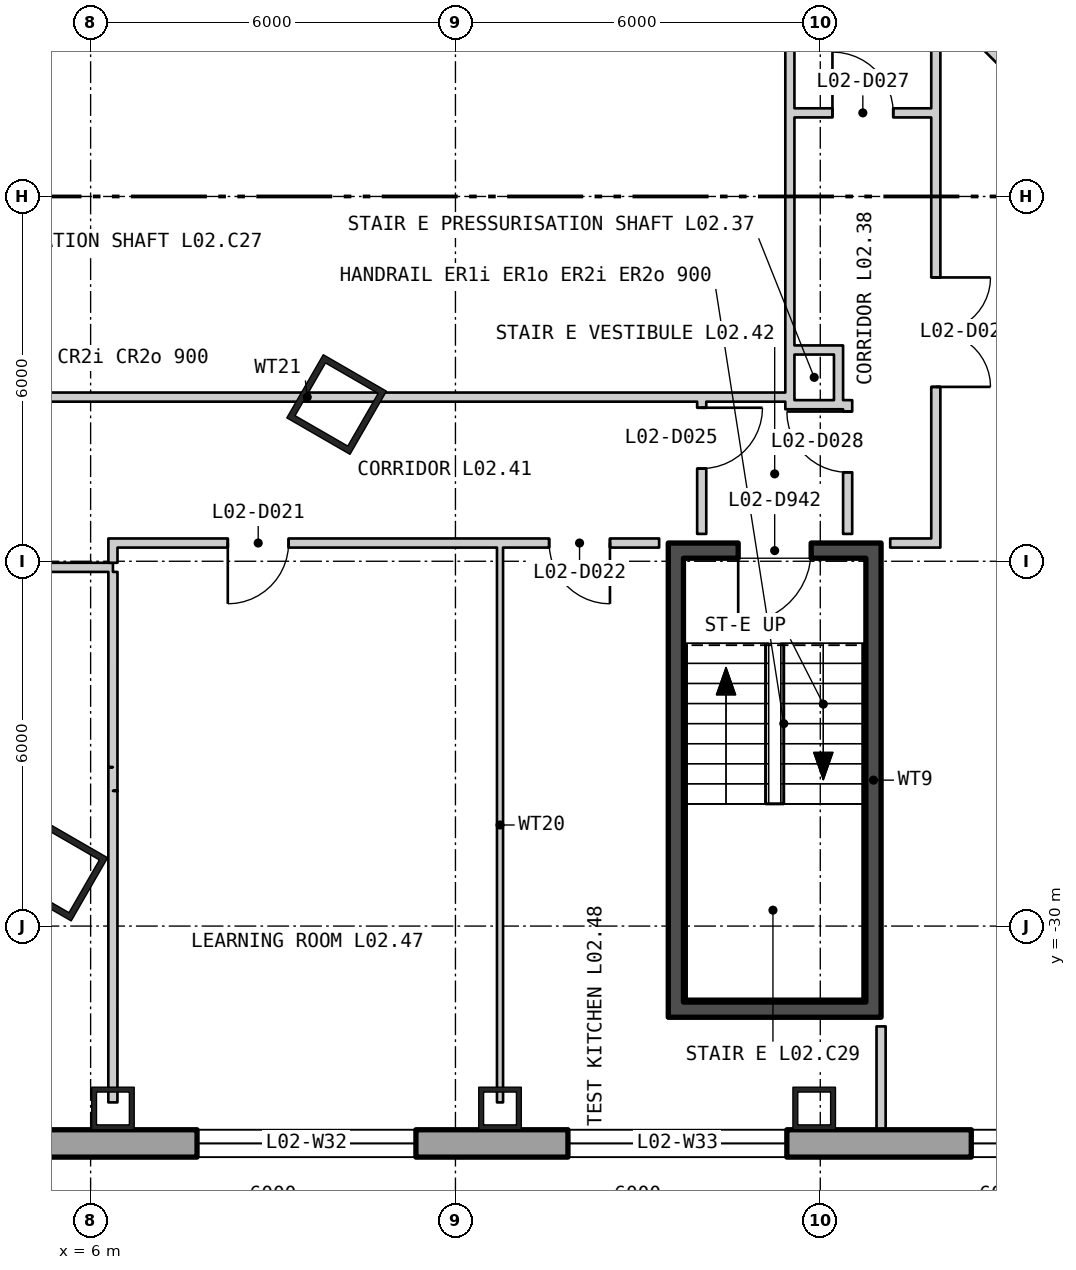
"""IFC4 building model, lengths in metres.
Left out: names, types, materials, properties, quantities, classifications, styles, units other than length and angle.
Written with IfcOpenShell. Run it as: python <this file> out.ifc"""

import sys

from ifc_helpers import new_model, si_unit, direction, frame, frame_2d, origin, origin_2d, place, context, subcontext, project, spatial, polyline, rectangle, hollow_rectangle, outline, extrude, element, fill, save


model = new_model("IFC4")
c1 = context("Model", 3, precision=1e-05, world=origin(), true_north=direction((0.0, 1.0)))
c2 = subcontext(c1, "Body", "Model", "MODEL_VIEW")
j1 = project(units=[si_unit("LENGTHUNIT", "METRE"), si_unit("PLANEANGLEUNIT", "RADIAN")], contexts=[c1])
p1 = place(None, origin())
s1 = spatial("IfcSite", under=j1, at=p1, CompositionType="ELEMENT")
p2 = place(p1, origin())
s2 = spatial("IfcBuilding", under=s1, at=p2, CompositionType="ELEMENT")
p3 = place(p2, frame((0.0, 0.0, 13.5)))
s3 = spatial("IfcBuildingStorey", under=s2, at=p3, CompositionType="ELEMENT", Elevation=13.5)
for number, where, z_axis, x_axis in (
    (1, (5.461, -29.096, 0.0), (0.0, 0.0, 1.0), (0.5, 0.866, 0.0)),
    (2, (10.046, -21.422, 0.0), (0.0, 0.0, 1.0), (0.5, 0.866, 0.0)),
):
    element("IfcColumn", number, at=place(p3, frame(where, z_axis=z_axis, x_axis=x_axis)), inside=s3, PredefinedType="COLUMN", context=c2, shape_type="SweptSolid", body=[
        extrude(hollow_rectangle(XDim=1.2, YDim=1.2, WallThickness=0.1, at=origin_2d()), origin(), (0.0, 0.0, 1.0), 5.1),
    ])
for number, where, z_axis, x_axis in (
    (3, (6.367, -33.0, 0.0), (0.0, 0.0, 1.0), (1.0, 0.0, 0.0)),
    (4, (12.733, -33.0, 0.0), (0.0, 0.0, 1.0), (1.0, 0.0, 0.0)),
    (5, (17.9, -33.0, 0.0), (0.0, 0.0, 1.0), (1.0, 0.0, 0.0)),
):
    element("IfcColumn", number, at=place(p3, frame(where, z_axis=z_axis, x_axis=x_axis)), inside=s3, PredefinedType="COLUMN", context=c2, shape_type="SweptSolid", body=[
        extrude(hollow_rectangle(XDim=0.7, YDim=0.7, WallThickness=0.08, at=origin_2d()), origin(), (0.0, 0.0, 1.0), 5.1),
    ])
p4 = place(p3, frame((-38.775, -33.575, -0.4), z_axis=(0.0, 0.0, 1.0), x_axis=(1.0, 0.0, 0.0)))
e6 = element("IfcWall", 6, at=p4, inside=s3, PredefinedType="SOLIDWALL", context=c2, shape_type="SweptSolid", body=[
    extrude(outline(polyline([(-0.225, -0.225), (77.775, -0.225), (77.325, 0.225), (0.225, 0.225), (-0.225, -0.225)])), origin(), (0.0, 0.0, 1.0), 5.1),
])
p5 = place(p4, frame((1.958, 0.0, 1.3)))
e7 = element("IfcOpeningElement", 7, at=p5, cuts=e6, PredefinedType="OPENING", context=c2, shape_type="SweptSolid", body=[
    extrude(rectangle(XDim=3.6, YDim=3.2, at=frame_2d((1.8, 1.6))), frame((0.0, 0.235, 0.0), z_axis=(0.0, -1.0, 0.0), x_axis=(1.0, 0.0, 0.0)), (0.0, 0.0, 1.0), 0.47),
])
p6 = place(p4, frame((8.325, 0.0, 1.3)))
e8 = element("IfcOpeningElement", 8, at=p6, cuts=e6, PredefinedType="OPENING", context=c2, shape_type="SweptSolid", body=[
    extrude(rectangle(XDim=3.6, YDim=3.2, at=frame_2d((1.8, 1.6))), frame((0.0, 0.235, 0.0), z_axis=(0.0, -1.0, 0.0), x_axis=(1.0, 0.0, 0.0)), (0.0, 0.0, 1.0), 0.47),
])
p7 = place(p4, frame((14.692, 0.0, 1.3)))
e9 = element("IfcOpeningElement", 9, at=p7, cuts=e6, PredefinedType="OPENING", context=c2, shape_type="SweptSolid", body=[
    extrude(rectangle(XDim=3.6, YDim=3.2, at=frame_2d((1.8, 1.6))), frame((0.0, 0.235, 0.0), z_axis=(0.0, -1.0, 0.0), x_axis=(1.0, 0.0, 0.0)), (0.0, 0.0, 1.0), 0.47),
])
p8 = place(p4, frame((21.325, 0.0, 1.3)))
e10 = element("IfcOpeningElement", 10, at=p8, cuts=e6, PredefinedType="OPENING", context=c2, shape_type="SweptSolid", body=[
    extrude(rectangle(XDim=3.6, YDim=3.2, at=frame_2d((1.8, 1.6))), frame((0.0, 0.235, 0.0), z_axis=(0.0, -1.0, 0.0), x_axis=(1.0, 0.0, 0.0)), (0.0, 0.0, 1.0), 0.47),
])
p9 = place(p4, frame((27.425, 0.0, 1.3)))
e11 = element("IfcOpeningElement", 11, at=p9, cuts=e6, PredefinedType="OPENING", context=c2, shape_type="SweptSolid", body=[
    extrude(rectangle(XDim=3.6, YDim=3.2, at=frame_2d((1.8, 1.6))), frame((0.0, 0.235, 0.0), z_axis=(0.0, -1.0, 0.0), x_axis=(1.0, 0.0, 0.0)), (0.0, 0.0, 1.0), 0.47),
])
p10 = place(p4, frame((33.792, 0.0, 1.3)))
e12 = element("IfcOpeningElement", 12, at=p10, cuts=e6, PredefinedType="OPENING", context=c2, shape_type="SweptSolid", body=[
    extrude(rectangle(XDim=3.6, YDim=3.2, at=frame_2d((1.8, 1.6))), frame((0.0, 0.235, 0.0), z_axis=(0.0, -1.0, 0.0), x_axis=(1.0, 0.0, 0.0)), (0.0, 0.0, 1.0), 0.47),
])
p11 = place(p4, frame((40.158, 0.0, 1.3)))
e13 = element("IfcOpeningElement", 13, at=p11, cuts=e6, PredefinedType="OPENING", context=c2, shape_type="SweptSolid", body=[
    extrude(rectangle(XDim=3.6, YDim=3.2, at=frame_2d((1.8, 1.6))), frame((0.0, 0.235, 0.0), z_axis=(0.0, -1.0, 0.0), x_axis=(1.0, 0.0, 0.0)), (0.0, 0.0, 1.0), 0.47),
])
p12 = place(p4, frame((46.525, 0.0, 1.3)))
e14 = element("IfcOpeningElement", 14, at=p12, cuts=e6, PredefinedType="OPENING", context=c2, shape_type="SweptSolid", body=[
    extrude(rectangle(XDim=3.6, YDim=3.2, at=frame_2d((1.8, 1.6))), frame((0.0, 0.235, 0.0), z_axis=(0.0, -1.0, 0.0), x_axis=(1.0, 0.0, 0.0)), (0.0, 0.0, 1.0), 0.47),
])
p13 = place(p4, frame((52.625, 0.0, 1.3)))
e15 = element("IfcOpeningElement", 15, at=p13, cuts=e6, PredefinedType="OPENING", context=c2, shape_type="SweptSolid", body=[
    extrude(rectangle(XDim=3.6, YDim=3.2, at=frame_2d((1.8, 1.6))), frame((0.0, 0.235, 0.0), z_axis=(0.0, -1.0, 0.0), x_axis=(1.0, 0.0, 0.0)), (0.0, 0.0, 1.0), 0.47),
])
p14 = place(p4, frame((59.258, 0.0, 1.3)))
e16 = element("IfcOpeningElement", 16, at=p14, cuts=e6, PredefinedType="OPENING", context=c2, shape_type="SweptSolid", body=[
    extrude(rectangle(XDim=3.6, YDim=3.2, at=frame_2d((1.8, 1.6))), frame((0.0, 0.235, 0.0), z_axis=(0.0, -1.0, 0.0), x_axis=(1.0, 0.0, 0.0)), (0.0, 0.0, 1.0), 0.47),
])
p15 = place(p4, frame((65.625, 0.0, 1.3)))
e17 = element("IfcOpeningElement", 17, at=p15, cuts=e6, PredefinedType="OPENING", context=c2, shape_type="SweptSolid", body=[
    extrude(rectangle(XDim=3.6, YDim=3.2, at=frame_2d((1.8, 1.6))), frame((0.0, 0.235, 0.0), z_axis=(0.0, -1.0, 0.0), x_axis=(1.0, 0.0, 0.0)), (0.0, 0.0, 1.0), 0.47),
])
p16 = place(p4, frame((71.992, 0.0, 1.3)))
e18 = element("IfcOpeningElement", 18, at=p16, cuts=e6, PredefinedType="OPENING", context=c2, shape_type="SweptSolid", body=[
    extrude(rectangle(XDim=3.6, YDim=3.2, at=frame_2d((1.8, 1.6))), frame((0.0, 0.235, 0.0), z_axis=(0.0, -1.0, 0.0), x_axis=(1.0, 0.0, 0.0)), (0.0, 0.0, 1.0), 0.47),
])
for number, where, z_axis, x_axis in (
    (19, (15.625, -31.25, 0.0), (0.0, 0.0, 1.0), (0.0, 1.0, 0.0)),
    (20, (18.875, -31.25, 0.0), (0.0, 0.0, 1.0), (0.0, 1.0, 0.0)),
):
    element("IfcWall", number, at=place(p3, frame(where, z_axis=z_axis, x_axis=x_axis)), inside=s3, PredefinedType="SHEAR", context=c2, shape_type="SweptSolid", body=[
        extrude(rectangle(XDim=7.3, YDim=0.25, at=frame_2d((3.65, 0.0))), origin(), (0.0, 0.0, 1.0), 4.88),
    ])
p17 = place(p3, frame((15.5, -31.375, 0.0), z_axis=(0.0, 0.0, 1.0), x_axis=(1.0, 0.0, 0.0)))
e21 = element("IfcWall", 21, at=p17, inside=s3, PredefinedType="SHEAR", context=c2, shape_type="SweptSolid", body=[
    extrude(rectangle(XDim=3.5, YDim=0.25, at=frame_2d((1.75, 0.0))), origin(), (0.0, 0.0, 1.0), 4.88),
])
p18 = place(p3, frame((15.5, -23.825, 0.0), z_axis=(0.0, 0.0, 1.0), x_axis=(1.0, 0.0, 0.0)))
e22 = element("IfcWall", 22, at=p18, inside=s3, PredefinedType="SHEAR", context=c2, shape_type="SweptSolid", body=[
    extrude(rectangle(XDim=3.5, YDim=0.25, at=frame_2d((1.75, 0.0))), origin(), (0.0, 0.0, 1.0), 4.88),
])
p19 = place(p18, frame((1.15, 0.0, 0.0)))
e23 = element("IfcOpeningElement", 23, at=p19, cuts=e22, PredefinedType="OPENING", context=c2, shape_type="SweptSolid", body=[
    extrude(rectangle(XDim=1.2, YDim=2.1, at=frame_2d((0.6, 1.05))), frame((0.0, 0.135, 0.0), z_axis=(0.0, -1.0, 0.0), x_axis=(1.0, 0.0, 0.0)), (0.0, 0.0, 1.0), 0.27),
])
p20 = place(p3, frame((-12.733, -24.1, 0.0), z_axis=(0.0, 0.0, 1.0), x_axis=(1.0, 0.0, 0.0)))
e24 = element("IfcWall", 24, at=p20, inside=s3, PredefinedType="PARTITIONING", context=c2, shape_type="SweptSolid", body=[
    extrude(rectangle(XDim=19.1, YDim=0.15, at=frame_2d((9.55, 0.0))), origin(), (0.0, 0.0, 1.0), 4.88),
])
p21 = place(p20, frame((8.907, 0.0, 0.0)))
e25 = element("IfcOpeningElement", 25, at=p21, cuts=e24, PredefinedType="OPENING", context=c2, shape_type="SweptSolid", body=[
    extrude(rectangle(XDim=1.0, YDim=2.1, at=frame_2d((0.5, 1.05))), frame((0.0, 0.085, 0.0), z_axis=(0.0, -1.0, 0.0), x_axis=(1.0, 0.0, 0.0)), (0.0, 0.0, 1.0), 0.17),
])
p22 = place(p3, frame((1.7, -21.3, 0.0), z_axis=(0.0, 0.0, 1.0), x_axis=(1.0, 0.0, 0.0)))
e26 = element("IfcWall", 26, at=p22, inside=s3, PredefinedType="PARTITIONING", context=c2, shape_type="SweptSolid", body=[
    extrude(rectangle(XDim=15.725, YDim=0.15, at=frame_2d((7.862, 0.0))), origin(), (0.0, 0.0, 1.0), 4.88),
])
p23 = place(p3, frame((6.366, -32.9, 0.0), z_axis=(0.0, 0.0, 1.0), x_axis=(0.000117096018, 0.999999993144, 0.0)))
e27 = element("IfcWall", 27, at=p23, inside=s3, PredefinedType="PARTITIONING", context=c2, shape_type="SweptSolid", body=[
    extrude(rectangle(XDim=5.124, YDim=0.15, at=frame_2d((2.562, 0.0))), origin(), (0.0, 0.0, 1.0), 4.28),
])
p24 = place(p3, frame((6.367, -27.776, 0.0), z_axis=(0.0, 0.0, 1.0), x_axis=(0.0, 1.0, 0.0)))
e28 = element("IfcWall", 28, at=p24, inside=s3, PredefinedType="PARTITIONING", context=c2, shape_type="SweptSolid", body=[
    extrude(rectangle(XDim=0.39, YDim=0.15, at=frame_2d((0.195, 0.0))), origin(), (0.0, 0.0, 1.0), 4.88),
])
p25 = place(p3, frame((6.367, -27.386, 0.0), z_axis=(0.0, 0.0, 1.0), x_axis=(0.000124571784, 0.999999992241, 0.0)))
e29 = element("IfcWall", 29, at=p25, inside=s3, PredefinedType="PARTITIONING", context=c2, shape_type="SweptSolid", body=[
    extrude(rectangle(XDim=3.211, YDim=0.15, at=frame_2d((1.605, 0.0))), origin(), (0.0, 0.0, 1.0), 4.28),
])
p26 = place(p3, frame((6.367, -24.025, 0.0), z_axis=(0.0, 0.0, 1.0), x_axis=(0.0, 1.0, 0.0)))
e30 = element("IfcWall", 30, at=p26, inside=s3, PredefinedType="PARTITIONING", context=c2, shape_type="SweptSolid", body=[
    extrude(rectangle(XDim=0.4, YDim=0.15, at=frame_2d((0.2, 0.0))), origin(), (0.0, 0.0, 1.0), 4.88),
])
p27 = place(p3, frame((6.442, -23.7, 0.0), z_axis=(0.0, 0.0, 1.0), x_axis=(1.0, 0.0, 0.0)))
e31 = element("IfcWall", 31, at=p27, inside=s3, PredefinedType="PARTITIONING", context=c2, shape_type="SweptSolid", body=[
    extrude(rectangle(XDim=8.908, YDim=0.15, at=frame_2d((4.454, 0.0))), origin(), (0.0, 0.0, 1.0), 4.88),
])
p28 = place(p27, frame((1.814, 0.0, 0.0)))
e32 = element("IfcOpeningElement", 32, at=p28, cuts=e31, PredefinedType="OPENING", context=c2, shape_type="SweptSolid", body=[
    extrude(rectangle(XDim=1.0, YDim=2.1, at=frame_2d((0.5, 1.05))), frame((0.0, 0.085, 0.0), z_axis=(0.0, -1.0, 0.0), x_axis=(1.0, 0.0, 0.0)), (0.0, 0.0, 1.0), 0.17),
])
p29 = place(p27, frame((7.099, 0.0, 0.0)))
e33 = element("IfcOpeningElement", 33, at=p29, cuts=e31, PredefinedType="OPENING", context=c2, shape_type="SweptSolid", body=[
    extrude(rectangle(XDim=1.0, YDim=2.1, at=frame_2d((0.5, 1.05))), frame((0.0, 0.085, 0.0), z_axis=(0.0, -1.0, 0.0), x_axis=(1.0, 0.0, 0.0)), (0.0, 0.0, 1.0), 0.17),
])
p30 = place(p3, frame((12.733, -32.9, 0.0), z_axis=(0.0, 0.0, 1.0), x_axis=(0.0, 1.0, 0.0)))
e34 = element("IfcWall", 34, at=p30, inside=s3, PredefinedType="PARTITIONING", context=c2, shape_type="SweptSolid", body=[
    extrude(rectangle(XDim=9.125, YDim=0.1, at=frame_2d((4.562, 0.0))), origin(), (0.0, 0.0, 1.0), 4.19),
])
p31 = place(p3, frame((16.05, -23.55, 0.0), z_axis=(0.0, 0.0, 1.0), x_axis=(0.0, 1.0, 0.0)))
e35 = element("IfcWall", 35, at=p31, inside=s3, PredefinedType="PARTITIONING", context=c2, shape_type="SweptSolid", body=[
    extrude(rectangle(XDim=2.175, YDim=0.15, at=frame_2d((1.087, 0.0))), origin(), (0.0, 0.0, 1.0), 4.88),
])
p32 = place(p31, frame((1.075, 0.0, 0.0)))
e36 = element("IfcOpeningElement", 36, at=p32, cuts=e35, PredefinedType="OPENING", context=c2, shape_type="SweptSolid", body=[
    extrude(rectangle(XDim=1.0, YDim=2.1, at=frame_2d((0.5, 1.05))), frame((0.0, 0.085, 0.0), z_axis=(0.0, -1.0, 0.0), x_axis=(1.0, 0.0, 0.0)), (0.0, 0.0, 1.0), 0.17),
])
p33 = place(p3, frame((17.5, -21.5, 0.0), z_axis=(0.0, 0.0, 1.0), x_axis=(0.0, 1.0, 0.0)))
e37 = element("IfcWall", 37, at=p33, inside=s3, PredefinedType="PARTITIONING", context=c2, shape_type="SweptSolid", body=[
    extrude(rectangle(XDim=0.987, YDim=0.15, at=frame_2d((0.493, 0.0))), origin(), (0.0, 0.0, 1.0), 4.88),
])
p34 = place(p3, frame((17.5, -20.513, 0.0), z_axis=(0.0, 0.0, 1.0), x_axis=(0.0, 1.0, 0.0)))
e38 = element("IfcWall", 38, at=p34, inside=s3, PredefinedType="PARTITIONING", context=c2, shape_type="SweptSolid", body=[
    extrude(rectangle(XDim=8.288, YDim=0.15, at=frame_2d((4.144, 0.0))), origin(), (0.0, 0.0, 1.0), 4.88),
])
for number, where, z_axis, x_axis in (
    (39, (17.575, -21.425, 0.0), (0.0, 0.0, 1.0), (1.0, 0.0, 0.0)),
    (40, (17.575, -20.525, 0.0), (0.0, 0.0, 1.0), (1.0, 0.0, 0.0)),
):
    element("IfcWall", number, at=place(p3, frame(where, z_axis=z_axis, x_axis=x_axis)), inside=s3, PredefinedType="PARTITIONING", context=c2, shape_type="SweptSolid", body=[
        extrude(rectangle(XDim=0.65, YDim=0.15, at=frame_2d((0.325, 0.0))), origin(), (0.0, 0.0, 1.0), 4.88),
    ])
p35 = place(p3, frame((17.575, -16.625, 0.0), z_axis=(0.0, 0.0, 1.0), x_axis=(1.0, 0.0, 0.0)))
e41 = element("IfcWall", 41, at=p35, inside=s3, PredefinedType="PARTITIONING", context=c2, shape_type="SweptSolid", body=[
    extrude(rectangle(XDim=2.25, YDim=0.15, at=frame_2d((1.125, 0.0))), origin(), (0.0, 0.0, 1.0), 4.88),
])
p36 = place(p35, frame((0.625, 0.0, 0.0)))
e42 = element("IfcOpeningElement", 42, at=p36, cuts=e41, PredefinedType="OPENING", context=c2, shape_type="SweptSolid", body=[
    extrude(rectangle(XDim=1.0, YDim=2.1, at=frame_2d((0.5, 1.05))), frame((0.0, 0.085, 0.0), z_axis=(0.0, -1.0, 0.0), x_axis=(1.0, 0.0, 0.0)), (0.0, 0.0, 1.0), 0.17),
])
p37 = place(p3, frame((18.3, -21.5, 0.0), z_axis=(0.0, 0.0, 1.0), x_axis=(0.0, 1.0, 0.0)))
e43 = element("IfcWall", 43, at=p37, inside=s3, PredefinedType="PARTITIONING", context=c2, shape_type="SweptSolid", body=[
    extrude(rectangle(XDim=1.05, YDim=0.15, at=frame_2d((0.525, 0.0))), origin(), (0.0, 0.0, 1.0), 4.88),
])
p38 = place(p3, frame((18.45, -23.55, 0.0), z_axis=(0.0, 0.0, 1.0), x_axis=(0.0, 1.0, 0.0)))
e44 = element("IfcWall", 44, at=p38, inside=s3, PredefinedType="PARTITIONING", context=c2, shape_type="SweptSolid", body=[
    extrude(rectangle(XDim=2.2, YDim=0.15, at=frame_2d((1.1, 0.0))), origin(), (0.0, 0.0, 1.0), 4.88),
])
p39 = place(p38, frame((1.013, 0.0, 0.0)))
e45 = element("IfcOpeningElement", 45, at=p39, cuts=e44, PredefinedType="OPENING", context=c2, shape_type="SweptSolid", body=[
    extrude(rectangle(XDim=1.0, YDim=2.1, at=frame_2d((0.5, 1.05))), frame((0.0, 0.085, 0.0), z_axis=(0.0, -1.0, 0.0), x_axis=(1.0, 0.0, 0.0)), (0.0, 0.0, 1.0), 0.17),
])
p40 = place(p3, frame((19.0, -33.348, 0.0), z_axis=(0.0, 0.0, 1.0), x_axis=(0.0, 1.0, 0.0)))
e46 = element("IfcWall", 46, at=p40, inside=s3, PredefinedType="PARTITIONING", context=c2, shape_type="SweptSolid", body=[
    extrude(rectangle(XDim=0.448, YDim=0.15, at=frame_2d((0.224, 0.0))), origin(), (0.0, 0.0, 1.0), 4.88),
])
p41 = place(p3, frame((19.0, -32.9, 0.0), z_axis=(0.0, 0.0, 1.0), x_axis=(0.0, 1.0, 0.0)))
e47 = element("IfcWall", 47, at=p41, inside=s3, PredefinedType="PARTITIONING", context=c2, shape_type="SweptSolid", body=[
    extrude(rectangle(XDim=1.25, YDim=0.15, at=frame_2d((0.625, 0.0))), origin(), (0.0, 0.0, 1.0), 4.19),
])
p42 = place(p3, frame((19.15, -23.7, 0.0), z_axis=(0.0, 0.0, 1.0), x_axis=(1.0, 0.0, 0.0)))
e48 = element("IfcWall", 48, at=p42, inside=s3, PredefinedType="PARTITIONING", context=c2, shape_type="SweptSolid", body=[
    extrude(rectangle(XDim=0.675, YDim=0.15, at=frame_2d((0.338, 0.0))), origin(), (0.0, 0.0, 1.0), 4.88),
])
p43 = place(p3, frame((19.9, -23.775, 0.0), z_axis=(0.0, 0.0, 1.0), x_axis=(0.0, 1.0, 0.0)))
e49 = element("IfcWall", 49, at=p43, inside=s3, PredefinedType="PARTITIONING", context=c2, shape_type="SweptSolid", body=[
    extrude(rectangle(XDim=21.187, YDim=0.15, at=frame_2d((10.594, 0.0))), origin(), (0.0, 0.0, 1.0), 4.88),
])
p44 = place(p43, frame((2.643, 0.0, 0.0)))
e50 = element("IfcOpeningElement", 50, at=p44, cuts=e49, PredefinedType="OPENING", context=c2, shape_type="SweptSolid", body=[
    extrude(rectangle(XDim=1.8, YDim=2.1, at=frame_2d((0.9, 1.05))), frame((0.0, 0.085, 0.0), z_axis=(0.0, -1.0, 0.0), x_axis=(1.0, 0.0, 0.0)), (0.0, 0.0, 1.0), 0.17),
])
p45 = place(p43, frame((11.998, 0.0, 0.0)))
e51 = element("IfcOpeningElement", 51, at=p45, cuts=e49, PredefinedType="OPENING", context=c2, shape_type="SweptSolid", body=[
    extrude(rectangle(XDim=1.8, YDim=2.1, at=frame_2d((0.9, 1.05))), frame((0.0, 0.085, 0.0), z_axis=(0.0, -1.0, 0.0), x_axis=(1.0, 0.0, 0.0)), (0.0, 0.0, 1.0), 0.17),
])
p46 = place(p3, frame((20.028, -14.827, 0.0), z_axis=(0.0, 0.0, 1.0), x_axis=(0.707106781187, -0.707106781187, 0.0)))
e52 = element("IfcWall", 52, at=p46, inside=s3, PredefinedType="PARTITIONING", context=c2, shape_type="SweptSolid", body=[
    extrude(rectangle(XDim=7.068, YDim=0.15, at=frame_2d((3.534, 0.0))), origin(), (0.0, 0.0, 1.0), 4.88),
])
p47 = place(p12, origin())
e53 = element("IfcWindow", 53, at=p47, inside=s3, PartitioningType="SINGLE_PANEL", PredefinedType="WINDOW", context=c2, shape_type="SweptSolid", body=[
    extrude(rectangle(XDim=3.6, YDim=3.2, at=frame_2d((1.8, 1.6))), frame((0.0, 0.105, 0.0), z_axis=(0.0, -1.0, 0.0), x_axis=(1.0, 0.0, 0.0)), (0.0, 0.0, 1.0), 0.06),
])
fill(e14, e53)
p48 = place(p13, origin())
e54 = element("IfcWindow", 54, at=p48, inside=s3, PartitioningType="SINGLE_PANEL", PredefinedType="WINDOW", context=c2, shape_type="SweptSolid", body=[
    extrude(rectangle(XDim=3.6, YDim=3.2, at=frame_2d((1.8, 1.6))), frame((0.0, 0.105, 0.0), z_axis=(0.0, -1.0, 0.0), x_axis=(1.0, 0.0, 0.0)), (0.0, 0.0, 1.0), 0.06),
])
fill(e15, e54)
p49 = place(p14, origin())
e55 = element("IfcWindow", 55, at=p49, inside=s3, PartitioningType="SINGLE_PANEL", PredefinedType="WINDOW", context=c2, shape_type="SweptSolid", body=[
    extrude(rectangle(XDim=3.6, YDim=3.2, at=frame_2d((1.8, 1.6))), frame((0.0, 0.105, 0.0), z_axis=(0.0, -1.0, 0.0), x_axis=(1.0, 0.0, 0.0)), (0.0, 0.0, 1.0), 0.06),
])
fill(e16, e55)
p50 = place(p19, origin())
e56 = element("IfcDoor", 56, at=p50, inside=s3, OperationType="SINGLE_SWING_LEFT", PredefinedType="DOOR", context=c2, shape_type="SweptSolid", body=[
    extrude(rectangle(XDim=1.2, YDim=2.1, at=frame_2d((0.6, 1.05))), frame((0.0, 0.025, 0.0), z_axis=(0.0, -1.0, 0.0), x_axis=(1.0, 0.0, 0.0)), (0.0, 0.0, 1.0), 0.05),
])
fill(e23, e56)
p51 = place(p28, origin())
e57 = element("IfcDoor", 57, at=p51, inside=s3, OperationType="SINGLE_SWING_LEFT", PredefinedType="DOOR", context=c2, shape_type="SweptSolid", body=[
    extrude(rectangle(XDim=1.0, YDim=2.1, at=frame_2d((0.5, 1.05))), frame((0.0, 0.025, 0.0), z_axis=(0.0, -1.0, 0.0), x_axis=(1.0, 0.0, 0.0)), (0.0, 0.0, 1.0), 0.05),
])
fill(e32, e57)
p52 = place(p29, origin())
e58 = element("IfcDoor", 58, at=p52, inside=s3, OperationType="SINGLE_SWING_RIGHT", PredefinedType="DOOR", context=c2, shape_type="SweptSolid", body=[
    extrude(rectangle(XDim=1.0, YDim=2.1, at=frame_2d((0.5, 1.05))), frame((0.0, 0.025, 0.0), z_axis=(0.0, -1.0, 0.0), x_axis=(1.0, 0.0, 0.0)), (0.0, 0.0, 1.0), 0.05),
])
fill(e33, e58)
p53 = place(p32, origin())
e59 = element("IfcDoor", 59, at=p53, inside=s3, OperationType="SINGLE_SWING_RIGHT", PredefinedType="DOOR", context=c2, shape_type="SweptSolid", body=[
    extrude(rectangle(XDim=1.0, YDim=2.1, at=frame_2d((0.5, 1.05))), frame((0.0, 0.025, 0.0), z_axis=(0.0, -1.0, 0.0), x_axis=(1.0, 0.0, 0.0)), (0.0, 0.0, 1.0), 0.05),
])
fill(e36, e59)
p54 = place(p36, origin())
e60 = element("IfcDoor", 60, at=p54, inside=s3, OperationType="SINGLE_SWING_RIGHT", PredefinedType="DOOR", context=c2, shape_type="SweptSolid", body=[
    extrude(rectangle(XDim=1.0, YDim=2.1, at=frame_2d((0.5, 1.05))), frame((0.0, 0.025, 0.0), z_axis=(0.0, -1.0, 0.0), x_axis=(1.0, 0.0, 0.0)), (0.0, 0.0, 1.0), 0.05),
])
fill(e42, e60)
p55 = place(p39, origin())
e61 = element("IfcDoor", 61, at=p55, inside=s3, OperationType="SINGLE_SWING_LEFT", PredefinedType="DOOR", context=c2, shape_type="SweptSolid", body=[
    extrude(rectangle(XDim=1.0, YDim=2.1, at=frame_2d((0.5, 1.05))), frame((0.0, 0.025, 0.0), z_axis=(0.0, -1.0, 0.0), x_axis=(1.0, 0.0, 0.0)), (0.0, 0.0, 1.0), 0.05),
])
fill(e45, e61)
p56 = place(p44, origin())
e62 = element("IfcDoor", 62, at=p56, inside=s3, OperationType="DOUBLE_DOOR_SINGLE_SWING", PredefinedType="DOOR", context=c2, shape_type="SweptSolid", body=[
    extrude(rectangle(XDim=1.8, YDim=2.1, at=frame_2d((0.9, 1.05))), frame((0.0, 0.025, 0.0), z_axis=(0.0, -1.0, 0.0), x_axis=(1.0, 0.0, 0.0)), (0.0, 0.0, 1.0), 0.05),
])
fill(e50, e62)
save(model, sys.argv[1])
